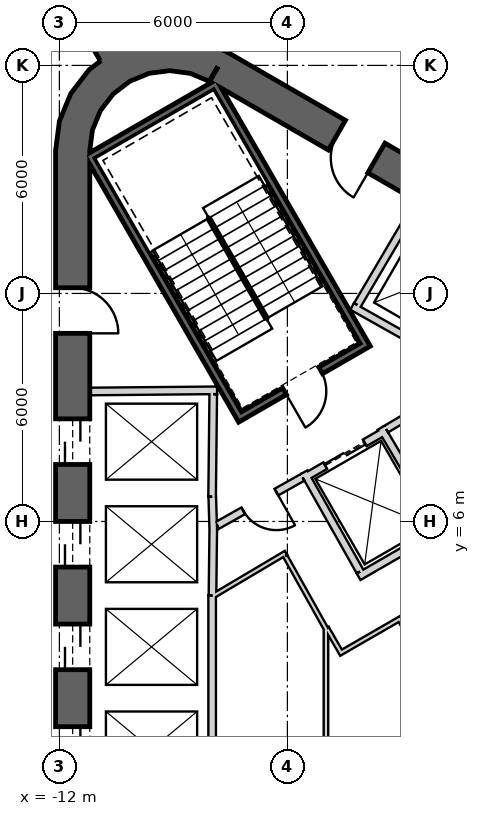
"""IFC4 building model, lengths in metres.
Left out: names, types, materials, properties, quantities, classifications, styles, units other than length and angle.
Written with IfcOpenShell. Run it as: python <this file> out.ifc"""

import sys

from ifc_helpers import new_model, si_unit, direction, frame, frame_2d, origin, place, context, subcontext, project, spatial, polyline, rectangle, outline, extrude, element, fill, save


model = new_model("IFC4")
c1 = context("Model", 3, precision=1e-05, world=origin(), true_north=direction((0.0, 1.0)))
c2 = subcontext(c1, "Body", "Model", "MODEL_VIEW")
j1 = project(units=[si_unit("LENGTHUNIT", "METRE"), si_unit("PLANEANGLEUNIT", "RADIAN")], contexts=[c1])
p1 = place(None, origin())
s1 = spatial("IfcSite", under=j1, at=p1, CompositionType="ELEMENT")
p2 = place(p1, origin())
s2 = spatial("IfcBuilding", under=s1, at=p2, CompositionType="ELEMENT")
p3 = place(p2, frame((0.0, 0.0, 45.5)))
s3 = spatial("IfcBuildingStorey", under=s2, at=p3, CompositionType="ELEMENT", Elevation=45.5)
p4 = place(p3, frame((19.475, 2.208, 0.0), z_axis=(0.0, 0.0, 1.0), x_axis=(-0.866028369851, 0.499994862586, 0.0)))
e1 = element("IfcWall", 1, at=p4, inside=s3, PredefinedType="SHEAR", context=c2, shape_type="SweptSolid", body=[
    extrude(rectangle(XDim=31.523, YDim=0.9, at=frame_2d((15.762, 0.0))), origin(), (0.0, 0.0, 1.0), 4.1),
])
p5 = place(p4, frame((7.062, 0.0, 0.0)))
e2 = element("IfcOpeningElement", 2, at=p5, cuts=e1, PredefinedType="OPENING", context=c2, shape_type="SweptSolid", body=[
    extrude(rectangle(XDim=1.2, YDim=2.4, at=frame_2d((0.6, 1.2))), frame((0.0, 0.46, 0.0), z_axis=(0.0, -1.0, 0.0), x_axis=(1.0, 0.0, 0.0)), (0.0, 0.0, 1.0), 0.92),
])
p6 = place(p4, frame((9.762, 0.0, 0.0)))
e3 = element("IfcOpeningElement", 3, at=p6, cuts=e1, PredefinedType="OPENING", context=c2, shape_type="SweptSolid", body=[
    extrude(rectangle(XDim=1.2, YDim=2.4, at=frame_2d((0.6, 1.2))), frame((0.0, 0.46, 0.0), z_axis=(0.0, -1.0, 0.0), x_axis=(1.0, 0.0, 0.0)), (0.0, 0.0, 1.0), 0.92),
])
p7 = place(p4, frame((12.462, 0.0, 0.0)))
e4 = element("IfcOpeningElement", 4, at=p7, cuts=e1, PredefinedType="OPENING", context=c2, shape_type="SweptSolid", body=[
    extrude(rectangle(XDim=1.2, YDim=2.4, at=frame_2d((0.6, 1.2))), frame((0.0, 0.46, 0.0), z_axis=(0.0, -1.0, 0.0), x_axis=(1.0, 0.0, 0.0)), (0.0, 0.0, 1.0), 0.92),
])
p8 = place(p4, frame((15.162, 0.0, 0.0)))
e5 = element("IfcOpeningElement", 5, at=p8, cuts=e1, PredefinedType="OPENING", context=c2, shape_type="SweptSolid", body=[
    extrude(rectangle(XDim=1.2, YDim=2.4, at=frame_2d((0.6, 1.2))), frame((0.0, 0.46, 0.0), z_axis=(0.0, -1.0, 0.0), x_axis=(1.0, 0.0, 0.0)), (0.0, 0.0, 1.0), 0.92),
])
p9 = place(p4, frame((17.862, 0.0, 0.0)))
e6 = element("IfcOpeningElement", 6, at=p9, cuts=e1, PredefinedType="OPENING", context=c2, shape_type="SweptSolid", body=[
    extrude(rectangle(XDim=1.2, YDim=2.4, at=frame_2d((0.6, 1.2))), frame((0.0, 0.46, 0.0), z_axis=(0.0, -1.0, 0.0), x_axis=(1.0, 0.0, 0.0)), (0.0, 0.0, 1.0), 0.92),
])
p10 = place(p4, frame((20.562, 0.0, 0.0)))
e7 = element("IfcOpeningElement", 7, at=p10, cuts=e1, PredefinedType="OPENING", context=c2, shape_type="SweptSolid", body=[
    extrude(rectangle(XDim=1.2, YDim=2.4, at=frame_2d((0.6, 1.2))), frame((0.0, 0.46, 0.0), z_axis=(0.0, -1.0, 0.0), x_axis=(1.0, 0.0, 0.0)), (0.0, 0.0, 1.0), 0.92),
])
p11 = place(p4, frame((23.262, 0.0, 0.0)))
e8 = element("IfcOpeningElement", 8, at=p11, cuts=e1, PredefinedType="OPENING", context=c2, shape_type="SweptSolid", body=[
    extrude(rectangle(XDim=1.2, YDim=2.4, at=frame_2d((0.6, 1.2))), frame((0.0, 0.46, 0.0), z_axis=(0.0, -1.0, 0.0), x_axis=(1.0, 0.0, 0.0)), (0.0, 0.0, 1.0), 0.92),
])
p12 = place(p4, frame((3.612, 0.0, 0.0)))
e9 = element("IfcOpeningElement", 9, at=p12, cuts=e1, PredefinedType="OPENING", context=c2, shape_type="SweptSolid", body=[
    extrude(rectangle(XDim=1.2, YDim=2.4, at=frame_2d((0.6, 1.2))), frame((0.0, 0.46, 0.0), z_axis=(0.0, -1.0, 0.0), x_axis=(1.0, 0.0, 0.0)), (0.0, 0.0, 1.0), 0.92),
])
p13 = place(p4, frame((26.712, 0.0, 0.0)))
e10 = element("IfcOpeningElement", 10, at=p13, cuts=e1, PredefinedType="OPENING", context=c2, shape_type="SweptSolid", body=[
    extrude(rectangle(XDim=1.2, YDim=2.4, at=frame_2d((0.6, 1.2))), frame((0.0, 0.46, 0.0), z_axis=(0.0, -1.0, 0.0), x_axis=(1.0, 0.0, 0.0)), (0.0, 0.0, 1.0), 0.92),
])
p14 = place(p3, frame((-11.65, 15.762, 0.0), z_axis=(0.0, 0.0, 1.0), x_axis=(0.0, -1.0, 0.0)))
e11 = element("IfcWall", 11, at=p14, inside=s3, PredefinedType="SHEAR", context=c2, shape_type="SweptSolid", body=[
    extrude(rectangle(XDim=31.523, YDim=0.9, at=frame_2d((15.762, 0.0))), origin(), (0.0, 0.0, 1.0), 4.1),
])
p15 = place(p14, frame((7.062, 0.0, 0.0)))
e12 = element("IfcOpeningElement", 12, at=p15, cuts=e11, PredefinedType="OPENING", context=c2, shape_type="SweptSolid", body=[
    extrude(rectangle(XDim=1.2, YDim=2.4, at=frame_2d((0.6, 1.2))), frame((0.0, 0.46, 0.0), z_axis=(0.0, -1.0, 0.0), x_axis=(1.0, 0.0, 0.0)), (0.0, 0.0, 1.0), 0.92),
])
p16 = place(p14, frame((9.762, 0.0, 0.0)))
e13 = element("IfcOpeningElement", 13, at=p16, cuts=e11, PredefinedType="OPENING", context=c2, shape_type="SweptSolid", body=[
    extrude(rectangle(XDim=1.2, YDim=2.4, at=frame_2d((0.6, 1.2))), frame((0.0, 0.46, 0.0), z_axis=(0.0, -1.0, 0.0), x_axis=(1.0, 0.0, 0.0)), (0.0, 0.0, 1.0), 0.92),
])
p17 = place(p14, frame((12.462, 0.0, 0.0)))
e14 = element("IfcOpeningElement", 14, at=p17, cuts=e11, PredefinedType="OPENING", context=c2, shape_type="SweptSolid", body=[
    extrude(rectangle(XDim=1.2, YDim=2.4, at=frame_2d((0.6, 1.2))), frame((0.0, 0.46, 0.0), z_axis=(0.0, -1.0, 0.0), x_axis=(1.0, 0.0, 0.0)), (0.0, 0.0, 1.0), 0.92),
])
p18 = place(p14, frame((15.162, 0.0, 0.0)))
e15 = element("IfcOpeningElement", 15, at=p18, cuts=e11, PredefinedType="OPENING", context=c2, shape_type="SweptSolid", body=[
    extrude(rectangle(XDim=1.2, YDim=2.4, at=frame_2d((0.6, 1.2))), frame((0.0, 0.46, 0.0), z_axis=(0.0, -1.0, 0.0), x_axis=(1.0, 0.0, 0.0)), (0.0, 0.0, 1.0), 0.92),
])
p19 = place(p14, frame((17.862, 0.0, 0.0)))
e16 = element("IfcOpeningElement", 16, at=p19, cuts=e11, PredefinedType="OPENING", context=c2, shape_type="SweptSolid", body=[
    extrude(rectangle(XDim=1.2, YDim=2.4, at=frame_2d((0.6, 1.2))), frame((0.0, 0.46, 0.0), z_axis=(0.0, -1.0, 0.0), x_axis=(1.0, 0.0, 0.0)), (0.0, 0.0, 1.0), 0.92),
])
p20 = place(p14, frame((20.562, 0.0, 0.0)))
e17 = element("IfcOpeningElement", 17, at=p20, cuts=e11, PredefinedType="OPENING", context=c2, shape_type="SweptSolid", body=[
    extrude(rectangle(XDim=1.2, YDim=2.4, at=frame_2d((0.6, 1.2))), frame((0.0, 0.46, 0.0), z_axis=(0.0, -1.0, 0.0), x_axis=(1.0, 0.0, 0.0)), (0.0, 0.0, 1.0), 0.92),
])
p21 = place(p14, frame((23.262, 0.0, 0.0)))
e18 = element("IfcOpeningElement", 18, at=p21, cuts=e11, PredefinedType="OPENING", context=c2, shape_type="SweptSolid", body=[
    extrude(rectangle(XDim=1.2, YDim=2.4, at=frame_2d((0.6, 1.2))), frame((0.0, 0.46, 0.0), z_axis=(0.0, -1.0, 0.0), x_axis=(1.0, 0.0, 0.0)), (0.0, 0.0, 1.0), 0.92),
])
p22 = place(p14, frame((3.612, 0.0, 0.0)))
e19 = element("IfcOpeningElement", 19, at=p22, cuts=e11, PredefinedType="OPENING", context=c2, shape_type="SweptSolid", body=[
    extrude(rectangle(XDim=1.2, YDim=2.4, at=frame_2d((0.6, 1.2))), frame((0.0, 0.46, 0.0), z_axis=(0.0, -1.0, 0.0), x_axis=(1.0, 0.0, 0.0)), (0.0, 0.0, 1.0), 0.92),
])
p23 = place(p14, frame((26.712, 0.0, 0.0)))
e20 = element("IfcOpeningElement", 20, at=p23, cuts=e11, PredefinedType="OPENING", context=c2, shape_type="SweptSolid", body=[
    extrude(rectangle(XDim=1.2, YDim=2.4, at=frame_2d((0.6, 1.2))), frame((0.0, 0.46, 0.0), z_axis=(0.0, -1.0, 0.0), x_axis=(1.0, 0.0, 0.0)), (0.0, 0.0, 1.0), 0.92),
])
p24 = place(p3, origin())
e21 = element("IfcWall", 21, at=p24, inside=s3, PredefinedType="SHEAR", context=c2, shape_type="SweptSolid", body=[
    extrude(outline(polyline([(-7.6, 18.36), (-8.323, 18.659), (-9.1, 18.762), (-9.876, 18.659), (-10.6, 18.36), (-11.221, 17.883), (-11.698, 17.262), (-11.998, 16.538), (-12.1, 15.762), (-11.2, 15.762), (-11.128, 16.305), (-10.919, 16.812), (-10.585, 17.247), (-10.15, 17.58), (-9.644, 17.79), (-9.1, 17.862), (-8.556, 17.79), (-8.05, 17.58), (-7.6, 18.36)])), origin(), (0.0, 0.0, 1.0), 4.1),
])
p25 = place(p3, frame((-10.575, 18.316, 0.0), z_axis=(0.0, 0.0, 1.0), x_axis=(-0.499996272984, 0.866027555568, 0.0)))
e22 = element("IfcWall", 22, at=p25, inside=s3, PredefinedType="SHEAR", context=c2, shape_type="SweptSolid", body=[
    extrude(rectangle(XDim=14.098, YDim=0.8, at=frame_2d((7.049, 0.0))), origin(), (0.0, 0.0, 1.0), 4.1),
])
p26 = place(p25, frame((0.7, 0.0, 0.0)))
e23 = element("IfcOpeningElement", 23, at=p26, cuts=e22, PredefinedType="OPENING", context=c2, shape_type="SweptSolid", body=[
    extrude(rectangle(XDim=1.4, YDim=2.4, at=frame_2d((0.7, 1.2))), frame((0.0, 0.41, 0.0), z_axis=(0.0, -1.0, 0.0), x_axis=(1.0, 0.0, 0.0)), (0.0, 0.0, 1.0), 0.82),
])
p27 = place(p3, frame((-11.2, 9.42, 0.0), z_axis=(0.0, 0.0, 1.0), x_axis=(0.999957167047, 0.009255488683, 0.0)))
e24 = element("IfcWall", 24, at=p27, inside=s3, PredefinedType="PLUMBINGWALL", context=c2, shape_type="SweptSolid", body=[
    extrude(rectangle(XDim=3.35, YDim=0.2, at=frame_2d((1.675, 0.0))), origin(), (0.0, 0.0, 1.0), 3.8),
])
p28 = place(p3, frame((-7.951, 9.35, 0.0), z_axis=(0.0, 0.0, 1.0), x_axis=(-0.011120469654, -0.999938165666, 0.0)))
e25 = element("IfcWall", 25, at=p28, inside=s3, PredefinedType="PLUMBINGWALL", context=c2, shape_type="SweptSolid", body=[
    extrude(rectangle(XDim=2.7, YDim=0.2, at=frame_2d((1.35, 0.0))), origin(), (0.0, 0.0, 1.0), 3.8),
])
p29 = place(p3, frame((-7.977, 6.65, 0.0), z_axis=(0.0, 0.0, 1.0), x_axis=(0.030861509705, -0.999523670164, 0.0)))
e26 = element("IfcWall", 26, at=p29, inside=s3, PredefinedType="PLUMBINGWALL", context=c2, shape_type="SweptSolid", body=[
    extrude(rectangle(XDim=0.878, YDim=0.2, at=frame_2d((0.439, 0.0))), origin(), (0.0, 0.0, 1.0), 3.8),
])
p30 = place(p3, frame((-7.949, 5.895, 0.0), z_axis=(0.0, 0.0, 1.0), x_axis=(-0.012042535896, -0.999927486035, 0.0)))
e27 = element("IfcWall", 27, at=p30, inside=s3, PredefinedType="PLUMBINGWALL", context=c2, shape_type="SweptSolid", body=[
    extrude(rectangle(XDim=1.845, YDim=0.2, at=frame_2d((0.922, 0.0))), origin(), (0.0, 0.0, 1.0), 3.8),
])
p31 = place(p3, frame((-7.98, 4.05, 0.0), z_axis=(0.0, 0.0, 1.0), x_axis=(0.0, -1.0, 0.0)))
e28 = element("IfcWall", 28, at=p31, inside=s3, PredefinedType="PLUMBINGWALL", context=c2, shape_type="SweptSolid", body=[
    extrude(rectangle(XDim=8.1, YDim=0.2, at=frame_2d((4.05, 0.0))), origin(), (0.0, 0.0, 1.0), 3.8),
])
p32 = place(p3, frame((-4.296, 11.659, 0.0), z_axis=(0.0, 0.0, 1.0), x_axis=(0.871534483978, -0.490334215854, 0.0)))
e29 = element("IfcWall", 29, at=p32, inside=s3, PredefinedType="PLUMBINGWALL", context=c2, shape_type="SweptSolid", body=[
    extrude(rectangle(XDim=2.7, YDim=0.2, at=frame_2d((1.35, 0.0))), origin(), (0.0, 0.0, 1.0), 3.8),
])
p33 = place(p3, frame((-4.158, 11.696, 0.0), z_axis=(0.0, 0.0, 1.0), x_axis=(0.508018930956, 0.861345903683, 0.0)))
e30 = element("IfcWall", 30, at=p33, inside=s3, PredefinedType="PLUMBINGWALL", context=c2, shape_type="SweptSolid", body=[
    extrude(rectangle(XDim=3.15, YDim=0.2, at=frame_2d((1.575, 0.0))), origin(), (0.0, 0.0, 1.0), 3.8),
])
p34 = place(p3, frame((-11.245, 15.678, -0.3), z_axis=(0.0, 0.0, 1.0), x_axis=(0.499977274689, -0.866038523851, 0.0)))
e31 = element("IfcWall", 31, at=p34, inside=s3, PredefinedType="SHEAR", context=c2, shape_type="SweptSolid", body=[
    extrude(rectangle(XDim=8.1, YDim=0.2, at=frame_2d((4.05, 0.0))), origin(), (0.0, 0.0, 1.0), 4.1),
])
p35 = place(p3, frame((-7.818, 17.541, -0.3), z_axis=(0.0, 0.0, 1.0), x_axis=(-0.866044365799, -0.499967155389, 0.0)))
e32 = element("IfcWall", 32, at=p35, inside=s3, PredefinedType="SHEAR", context=c2, shape_type="SweptSolid", body=[
    extrude(rectangle(XDim=3.8, YDim=0.2, at=frame_2d((1.9, 0.0))), origin(), (0.0, 0.0, 1.0), 4.1),
])
p36 = place(p3, frame((-7.854, 17.405, -0.3), z_axis=(0.0, 0.0, 1.0), x_axis=(0.499997992926, -0.866026562566, 0.0)))
e33 = element("IfcWall", 33, at=p36, inside=s3, PredefinedType="SHEAR", context=c2, shape_type="SweptSolid", body=[
    extrude(rectangle(XDim=7.9, YDim=0.2, at=frame_2d((3.95, 0.0))), origin(), (0.0, 0.0, 1.0), 4.1),
])
p37 = place(p3, frame((-7.159, 8.8, -0.3), z_axis=(0.0, 0.0, 1.0), x_axis=(0.866047807691, 0.499961193289, 0.0)))
e34 = element("IfcWall", 34, at=p37, inside=s3, PredefinedType="SHEAR", context=c2, shape_type="SweptSolid", body=[
    extrude(rectangle(XDim=3.6, YDim=0.2, at=frame_2d((1.8, 0.0))), origin(), (0.0, 0.0, 1.0), 4.1),
])
p38 = place(p37, frame((1.25, 0.0, 0.3)))
e35 = element("IfcOpeningElement", 35, at=p38, cuts=e34, PredefinedType="OPENING", context=c2, shape_type="SweptSolid", body=[
    extrude(rectangle(XDim=1.1, YDim=2.1, at=frame_2d((0.55, 1.05))), frame((0.0, 0.11, 0.0), z_axis=(0.0, -1.0, 0.0), x_axis=(1.0, 0.0, 0.0)), (0.0, 0.0, 1.0), 0.22),
])
p39 = place(p3, frame((-5.524, 7.168, 0.0), z_axis=(0.0, 0.0, 1.0), x_axis=(0.866024647952, 0.500001309137, 0.0)))
e36 = element("IfcWall", 36, at=p39, inside=s3, PredefinedType="PLUMBINGWALL", context=c2, shape_type="SweptSolid", body=[
    extrude(rectangle(XDim=2.4, YDim=0.2, at=frame_2d((1.2, 0.0))), origin(), (0.0, 0.0, 1.0), 3.8),
])
p40 = place(p39, frame((0.6, 0.0, 0.0)))
e37 = element("IfcOpeningElement", 37, at=p40, cuts=e36, PredefinedType="OPENING", context=c2, shape_type="SweptSolid", body=[
    extrude(rectangle(XDim=1.2, YDim=2.4, at=frame_2d((0.6, 1.2))), frame((0.0, 0.11, 0.0), z_axis=(0.0, -1.0, 0.0), x_axis=(1.0, 0.0, 0.0)), (0.0, 0.0, 1.0), 0.22),
])
p41 = place(p3, frame((-3.538, 8.465, 0.0), z_axis=(0.0, 0.0, 1.0), x_axis=(0.508647062354, -0.860975125052, 0.0)))
e38 = element("IfcWall", 38, at=p41, inside=s3, PredefinedType="PLUMBINGWALL", context=c2, shape_type="SweptSolid", body=[
    extrude(rectangle(XDim=3.1, YDim=0.2, at=frame_2d((1.55, 0.0))), origin(), (0.0, 0.0, 1.0), 3.8),
])
p42 = place(p3, frame((-2.108, 5.711, 0.0), z_axis=(0.0, 0.0, 1.0), x_axis=(-0.866009305107, -0.50002788269, 0.0)))
e39 = element("IfcWall", 39, at=p42, inside=s3, PredefinedType="PLUMBINGWALL", context=c2, shape_type="SweptSolid", body=[
    extrude(rectangle(XDim=2.329, YDim=0.2, at=frame_2d((1.165, 0.0))), origin(), (0.0, 0.0, 1.0), 3.8),
])
p43 = place(p3, frame((-5.562, 7.296, 0.0), z_axis=(0.0, 0.0, 1.0), x_axis=(0.49134651263, -0.870964180966, 0.0)))
e40 = element("IfcWall", 40, at=p43, inside=s3, PredefinedType="PLUMBINGWALL", context=c2, shape_type="SweptSolid", body=[
    extrude(rectangle(XDim=3.0, YDim=0.2, at=frame_2d((1.5, 0.0))), origin(), (0.0, 0.0, 1.0), 3.8),
])
p44 = place(p3, frame((-1.18, 9.744, 0.0), z_axis=(0.0, 0.0, 1.0), x_axis=(-0.860615607571, -0.509255118781, 0.0)))
e41 = element("IfcWall", 41, at=p44, inside=s3, PredefinedType="PARTITIONING", context=c2, shape_type="SweptSolid", body=[
    extrude(rectangle(XDim=2.581, YDim=0.2, at=frame_2d((1.29, 0.0))), origin(), (0.0, 0.0, 1.0), 3.8),
])
p45 = place(p3, frame((-5.6, 7.16, 0.0), z_axis=(0.0, 0.0, 1.0), x_axis=(-0.871363259478, -0.490638431059, 0.0)))
e42 = element("IfcWall", 42, at=p45, inside=s3, PredefinedType="PARTITIONING", context=c2, shape_type="SweptSolid", body=[
    extrude(rectangle(XDim=2.581, YDim=0.2, at=frame_2d((1.291, 0.0))), origin(), (0.0, 0.0, 1.0), 3.8),
])
p46 = place(p45, frame((0.791, 0.0, 0.0)))
e43 = element("IfcOpeningElement", 43, at=p46, cuts=e42, PredefinedType="OPENING", context=c2, shape_type="SweptSolid", body=[
    extrude(rectangle(XDim=1.0, YDim=2.1, at=frame_2d((0.5, 1.05))), frame((0.0, 0.11, 0.0), z_axis=(0.0, -1.0, 0.0), x_axis=(1.0, 0.0, 0.0)), (0.0, 0.0, 1.0), 0.22),
])
p47 = place(p3, frame((-4.985, -3.235, 0.0), z_axis=(0.0, 0.0, 1.0), x_axis=(0.0, 1.0, 0.0)))
e44 = element("IfcWall", 44, at=p47, inside=s3, PredefinedType="PARTITIONING", context=c2, shape_type="SweptSolid", body=[
    extrude(rectangle(XDim=6.469, YDim=0.12, at=frame_2d((3.235, 0.0))), origin(), (0.0, 0.0, 1.0), 3.8),
])
p48 = place(p3, frame((-6.037, 5.176, 0.0), z_axis=(0.0, 0.0, 1.0), x_axis=(-0.860106072674, -0.510115225953, 0.0)))
e45 = element("IfcWall", 45, at=p48, inside=s3, PredefinedType="PARTITIONING", context=c2, shape_type="SweptSolid", body=[
    extrude(rectangle(XDim=2.225, YDim=0.12, at=frame_2d((1.112, 0.0))), origin(), (0.0, 0.0, 1.0), 3.8),
])
p49 = place(p3, frame((-4.983, 3.172, 0.0), z_axis=(0.0, 0.0, 1.0), x_axis=(-0.488728310113, 0.872436037136, 0.0)))
e46 = element("IfcWall", 46, at=p49, inside=s3, PredefinedType="PARTITIONING", context=c2, shape_type="SweptSolid", body=[
    extrude(rectangle(XDim=2.201, YDim=0.12, at=frame_2d((1.101, 0.0))), origin(), (0.0, 0.0, 1.0), 3.8),
])
p50 = place(p3, frame((-4.558, 2.495, 0.0), z_axis=(0.0, 0.0, 1.0), x_axis=(-0.499757756434, 0.866165218006, 0.0)))
e47 = element("IfcWall", 47, at=p50, inside=s3, PredefinedType="PARTITIONING", context=c2, shape_type="SweptSolid", body=[
    extrude(rectangle(XDim=0.798, YDim=0.12, at=frame_2d((0.399, 0.0))), origin(), (0.0, 0.0, 1.0), 3.8),
])
p51 = place(p3, frame((-2.999, 3.465, 0.0), z_axis=(0.0, 0.0, 1.0), x_axis=(-0.866059624469, -0.499940723351, 0.0)))
e48 = element("IfcWall", 48, at=p51, inside=s3, PredefinedType="PARTITIONING", context=c2, shape_type="SweptSolid", body=[
    extrude(rectangle(XDim=1.775, YDim=0.12, at=frame_2d((0.888, 0.0))), origin(), (0.0, 0.0, 1.0), 3.8),
])
p52 = place(p3, frame((-1.42, 0.61, 0.0), z_axis=(0.0, 0.0, 1.0), x_axis=(-0.500034908033, 0.866005248684, 0.0)))
e49 = element("IfcWall", 49, at=p52, inside=s3, PredefinedType="PARTITIONING", context=c2, shape_type="SweptSolid", body=[
    extrude(rectangle(XDim=3.201, YDim=0.12, at=frame_2d((1.601, 0.0))), origin(), (0.0, 0.0, 1.0), 3.8),
])
p53 = place(p3, frame((16.423, 8.185, 0.0), z_axis=(0.0, 0.0, 1.0), x_axis=(-0.866026561282, 0.49999799515, 0.0)))
e50 = element("IfcWall", 50, at=p53, inside=s3, PredefinedType="PARTITIONING", context=c2, shape_type="SweptSolid", body=[
    extrude(rectangle(XDim=26.435, YDim=0.2, at=frame_2d((13.218, 0.0))), origin(), (0.0, 0.0, 1.0), 2.98),
])
p54 = place(p53, frame((14.356, 0.0, 0.0)))
e51 = element("IfcOpeningElement", 51, at=p54, cuts=e50, PredefinedType="OPENING", context=c2, shape_type="SweptSolid", body=[
    extrude(rectangle(XDim=1.0, YDim=2.1, at=frame_2d((0.5, 1.05))), frame((0.0, 0.11, 0.0), z_axis=(0.0, -1.0, 0.0), x_axis=(1.0, 0.0, 0.0)), (0.0, 0.0, 1.0), 0.22),
])
p55 = place(p53, frame((1.139, 0.0, 0.0)))
e52 = element("IfcOpeningElement", 52, at=p55, cuts=e50, PredefinedType="OPENING", context=c2, shape_type="SweptSolid", body=[
    extrude(rectangle(XDim=1.0, YDim=2.1, at=frame_2d((0.5, 1.05))), frame((0.0, 0.11, 0.0), z_axis=(0.0, -1.0, 0.0), x_axis=(1.0, 0.0, 0.0)), (0.0, 0.0, 1.0), 0.22),
])
p56 = place(p38, origin())
e53 = element("IfcDoor", 53, at=p56, inside=s3, OperationType="SINGLE_SWING_LEFT", PredefinedType="USERDEFINED", context=c2, shape_type="SweptSolid", body=[
    extrude(rectangle(XDim=1.1, YDim=2.1, at=frame_2d((0.55, 1.05))), frame((0.0, 0.025, 0.0), z_axis=(0.0, -1.0, 0.0), x_axis=(1.0, 0.0, 0.0)), (0.0, 0.0, 1.0), 0.05),
])
fill(e35, e53)
p57 = place(p46, origin())
e54 = element("IfcDoor", 54, at=p57, inside=s3, OperationType="SINGLE_SWING_RIGHT", PredefinedType="USERDEFINED", context=c2, shape_type="SweptSolid", body=[
    extrude(rectangle(XDim=1.0, YDim=2.1, at=frame_2d((0.5, 1.05))), frame((0.0, 0.025, 0.0), z_axis=(0.0, -1.0, 0.0), x_axis=(1.0, 0.0, 0.0)), (0.0, 0.0, 1.0), 0.05),
])
fill(e43, e54)
p58 = place(p40, origin())
e55 = element("IfcDoor", 55, at=p58, inside=s3, OperationType="SLIDING_TO_LEFT", PredefinedType="USERDEFINED", context=c2, shape_type="SweptSolid", body=[
    extrude(rectangle(XDim=1.2, YDim=2.4, at=frame_2d((0.6, 1.2))), frame((0.0, 0.025, 0.0), z_axis=(0.0, -1.0, 0.0), x_axis=(1.0, 0.0, 0.0)), (0.0, 0.0, 1.0), 0.05),
])
fill(e37, e55)
p59 = place(p15, origin())
e56 = element("IfcDoor", 56, at=p59, inside=s3, OperationType="SLIDING_TO_LEFT", PredefinedType="USERDEFINED", context=c2, shape_type="SweptSolid", body=[
    extrude(rectangle(XDim=1.2, YDim=2.4, at=frame_2d((0.6, 1.2))), frame((0.0, 0.025, 0.0), z_axis=(0.0, -1.0, 0.0), x_axis=(1.0, 0.0, 0.0)), (0.0, 0.0, 1.0), 0.05),
])
fill(e12, e56)
p60 = place(p16, origin())
e57 = element("IfcDoor", 57, at=p60, inside=s3, OperationType="SLIDING_TO_LEFT", PredefinedType="USERDEFINED", context=c2, shape_type="SweptSolid", body=[
    extrude(rectangle(XDim=1.2, YDim=2.4, at=frame_2d((0.6, 1.2))), frame((0.0, 0.025, 0.0), z_axis=(0.0, -1.0, 0.0), x_axis=(1.0, 0.0, 0.0)), (0.0, 0.0, 1.0), 0.05),
])
fill(e13, e57)
p61 = place(p17, origin())
e58 = element("IfcDoor", 58, at=p61, inside=s3, OperationType="SLIDING_TO_LEFT", PredefinedType="USERDEFINED", context=c2, shape_type="SweptSolid", body=[
    extrude(rectangle(XDim=1.2, YDim=2.4, at=frame_2d((0.6, 1.2))), frame((0.0, 0.025, 0.0), z_axis=(0.0, -1.0, 0.0), x_axis=(1.0, 0.0, 0.0)), (0.0, 0.0, 1.0), 0.05),
])
fill(e14, e58)
p62 = place(p18, origin())
e59 = element("IfcDoor", 59, at=p62, inside=s3, OperationType="SLIDING_TO_LEFT", PredefinedType="USERDEFINED", context=c2, shape_type="SweptSolid", body=[
    extrude(rectangle(XDim=1.2, YDim=2.4, at=frame_2d((0.6, 1.2))), frame((0.0, 0.025, 0.0), z_axis=(0.0, -1.0, 0.0), x_axis=(1.0, 0.0, 0.0)), (0.0, 0.0, 1.0), 0.05),
])
fill(e15, e59)
p63 = place(p13, origin())
e60 = element("IfcDoor", 60, at=p63, inside=s3, OperationType="SINGLE_SWING_RIGHT", PredefinedType="USERDEFINED", context=c2, shape_type="SweptSolid", body=[
    extrude(rectangle(XDim=1.2, YDim=2.4, at=frame_2d((0.6, 1.2))), frame((0.0, 0.025, 0.0), z_axis=(0.0, -1.0, 0.0), x_axis=(1.0, 0.0, 0.0)), (0.0, 0.0, 1.0), 0.05),
])
fill(e10, e60)
p64 = place(p22, origin())
e61 = element("IfcDoor", 61, at=p64, inside=s3, OperationType="SINGLE_SWING_RIGHT", PredefinedType="USERDEFINED", context=c2, shape_type="SweptSolid", body=[
    extrude(rectangle(XDim=1.2, YDim=2.4, at=frame_2d((0.6, 1.2))), frame((0.0, 0.025, 0.0), z_axis=(0.0, -1.0, 0.0), x_axis=(1.0, 0.0, 0.0)), (0.0, 0.0, 1.0), 0.05),
])
fill(e19, e61)
save(model, sys.argv[1])
